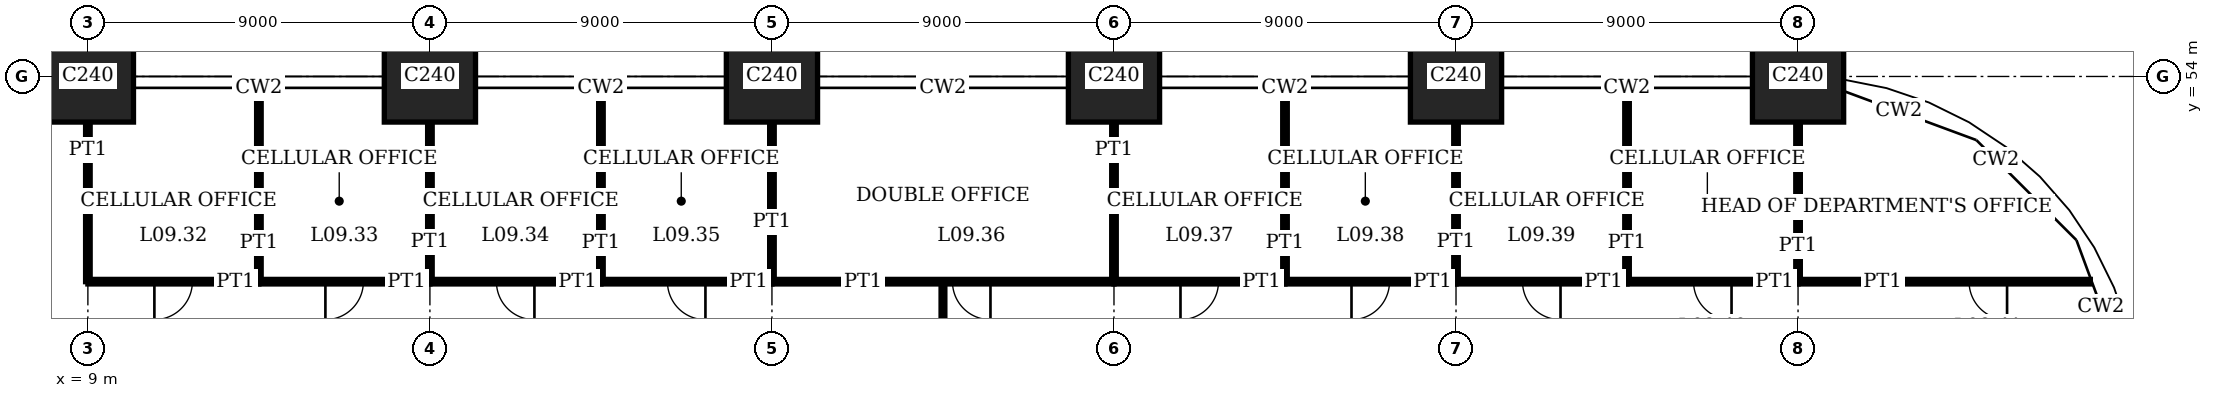
"""IFC4 building model, lengths in metres.
Left out: names, types, materials, properties, quantities, classifications, styles, units other than length and angle.
Written with IfcOpenShell. Run it as: python <this file> out.ifc"""

import sys

from ifc_helpers import new_model, si_unit, direction, frame, frame_2d, origin, origin_2d, place, context, subcontext, project, spatial, rectangle, extrude, element, fill, save


model = new_model("IFC4")
c1 = context("Model", 3, precision=1e-05, world=origin(), true_north=direction((0.0, 1.0)))
c2 = subcontext(c1, "Body", "Model", "MODEL_VIEW")
j1 = project(units=[si_unit("LENGTHUNIT", "METRE"), si_unit("PLANEANGLEUNIT", "RADIAN")], contexts=[c1])
p1 = place(None, origin())
s1 = spatial("IfcSite", under=j1, at=p1, CompositionType="ELEMENT")
p2 = place(p1, origin())
s2 = spatial("IfcBuilding", under=s1, at=p2, CompositionType="ELEMENT")
p3 = place(p2, frame((0.0, 0.0, 39.8)))
s3 = spatial("IfcBuildingStorey", under=s2, at=p3, CompositionType="ELEMENT", Elevation=39.8)
for number, where, z_axis, x_axis in (
    (1, (9.0, 54.0, 0.0), (0.0, 0.0, 1.0), (1.0, 0.0, 0.0)),
    (2, (18.0, 54.0, 0.0), (0.0, 0.0, 1.0), (1.0, 0.0, 0.0)),
    (3, (27.0, 54.0, 0.0), (0.0, 0.0, 1.0), (1.0, 0.0, 0.0)),
    (4, (36.0, 54.0, 0.0), (0.0, 0.0, 1.0), (1.0, 0.0, 0.0)),
    (5, (45.0, 54.0, 0.0), (0.0, 0.0, 1.0), (1.0, 0.0, 0.0)),
    (6, (54.0, 54.0, 0.0), (0.0, 0.0, 1.0), (1.0, 0.0, 0.0)),
):
    element("IfcColumn", number, at=place(p3, frame(where, z_axis=z_axis, x_axis=x_axis)), inside=s3, PredefinedType="COLUMN", context=c2, shape_type="SweptSolid", body=[
        extrude(rectangle(XDim=2.4, YDim=2.4, at=origin_2d()), origin(), (0.0, 0.0, 1.0), 4.0),
    ])
p4 = place(p3, frame((9.0, 48.6, 0.0), z_axis=(0.0, 0.0, 1.0), x_axis=(1.0, 0.0, 0.0)))
e7 = element("IfcWall", 7, at=p4, inside=s3, PredefinedType="PARTITIONING", context=c2, shape_type="SweptSolid", body=[
    extrude(rectangle(XDim=4.5, YDim=0.12, at=frame_2d((2.25, 0.0))), origin(), (0.0, 0.0, 1.0), 3.75),
])
p5 = place(p4, frame((1.75, 0.0, 0.0)))
e8 = element("IfcOpeningElement", 8, at=p5, cuts=e7, PredefinedType="OPENING", context=c2, shape_type="SweptSolid", body=[
    extrude(rectangle(XDim=1.0, YDim=2.4, at=frame_2d((0.5, 1.2))), frame((0.0, 0.07, 0.0), z_axis=(0.0, -1.0, 0.0), x_axis=(1.0, 0.0, 0.0)), (0.0, 0.0, 1.0), 0.14),
])
p6 = place(p3, frame((13.5, 48.6, 0.0), z_axis=(0.0, 0.0, 1.0), x_axis=(1.0, 0.0, 0.0)))
e9 = element("IfcWall", 9, at=p6, inside=s3, PredefinedType="PARTITIONING", context=c2, shape_type="SweptSolid", body=[
    extrude(rectangle(XDim=4.5, YDim=0.12, at=frame_2d((2.25, 0.0))), origin(), (0.0, 0.0, 1.0), 3.75),
])
p7 = place(p6, frame((1.75, 0.0, 0.0)))
e10 = element("IfcOpeningElement", 10, at=p7, cuts=e9, PredefinedType="OPENING", context=c2, shape_type="SweptSolid", body=[
    extrude(rectangle(XDim=1.0, YDim=2.4, at=frame_2d((0.5, 1.2))), frame((0.0, 0.07, 0.0), z_axis=(0.0, -1.0, 0.0), x_axis=(1.0, 0.0, 0.0)), (0.0, 0.0, 1.0), 0.14),
])
p8 = place(p3, frame((18.0, 48.6, 0.0), z_axis=(0.0, 0.0, 1.0), x_axis=(1.0, 0.0, 0.0)))
e11 = element("IfcWall", 11, at=p8, inside=s3, PredefinedType="PARTITIONING", context=c2, shape_type="SweptSolid", body=[
    extrude(rectangle(XDim=4.5, YDim=0.12, at=frame_2d((2.25, 0.0))), origin(), (0.0, 0.0, 1.0), 3.75),
])
p9 = place(p8, frame((1.75, 0.0, 0.0)))
e12 = element("IfcOpeningElement", 12, at=p9, cuts=e11, PredefinedType="OPENING", context=c2, shape_type="SweptSolid", body=[
    extrude(rectangle(XDim=1.0, YDim=2.4, at=frame_2d((0.5, 1.2))), frame((0.0, 0.07, 0.0), z_axis=(0.0, -1.0, 0.0), x_axis=(1.0, 0.0, 0.0)), (0.0, 0.0, 1.0), 0.14),
])
p10 = place(p3, frame((22.5, 48.6, 0.0), z_axis=(0.0, 0.0, 1.0), x_axis=(1.0, 0.0, 0.0)))
e13 = element("IfcWall", 13, at=p10, inside=s3, PredefinedType="PARTITIONING", context=c2, shape_type="SweptSolid", body=[
    extrude(rectangle(XDim=4.5, YDim=0.12, at=frame_2d((2.25, 0.0))), origin(), (0.0, 0.0, 1.0), 3.75),
])
p11 = place(p10, frame((1.75, 0.0, 0.0)))
e14 = element("IfcOpeningElement", 14, at=p11, cuts=e13, PredefinedType="OPENING", context=c2, shape_type="SweptSolid", body=[
    extrude(rectangle(XDim=1.0, YDim=2.4, at=frame_2d((0.5, 1.2))), frame((0.0, 0.07, 0.0), z_axis=(0.0, -1.0, 0.0), x_axis=(1.0, 0.0, 0.0)), (0.0, 0.0, 1.0), 0.14),
])
p12 = place(p3, frame((27.0, 48.6, 0.0), z_axis=(0.0, 0.0, 1.0), x_axis=(1.0, 0.0, 0.0)))
e15 = element("IfcWall", 15, at=p12, inside=s3, PredefinedType="PARTITIONING", context=c2, shape_type="SweptSolid", body=[
    extrude(rectangle(XDim=9.0, YDim=0.12, at=frame_2d((4.5, 0.0))), origin(), (0.0, 0.0, 1.0), 3.75),
])
p13 = place(p12, frame((4.75, 0.0, 0.0)))
e16 = element("IfcOpeningElement", 16, at=p13, cuts=e15, PredefinedType="OPENING", context=c2, shape_type="SweptSolid", body=[
    extrude(rectangle(XDim=1.0, YDim=2.4, at=frame_2d((0.5, 1.2))), frame((0.0, 0.07, 0.0), z_axis=(0.0, -1.0, 0.0), x_axis=(1.0, 0.0, 0.0)), (0.0, 0.0, 1.0), 0.14),
])
p14 = place(p3, frame((36.0, 48.6, 0.0), z_axis=(0.0, 0.0, 1.0), x_axis=(1.0, 0.0, 0.0)))
e17 = element("IfcWall", 17, at=p14, inside=s3, PredefinedType="PARTITIONING", context=c2, shape_type="SweptSolid", body=[
    extrude(rectangle(XDim=4.5, YDim=0.12, at=frame_2d((2.25, 0.0))), origin(), (0.0, 0.0, 1.0), 3.75),
])
p15 = place(p14, frame((1.75, 0.0, 0.0)))
e18 = element("IfcOpeningElement", 18, at=p15, cuts=e17, PredefinedType="OPENING", context=c2, shape_type="SweptSolid", body=[
    extrude(rectangle(XDim=1.0, YDim=2.4, at=frame_2d((0.5, 1.2))), frame((0.0, 0.07, 0.0), z_axis=(0.0, -1.0, 0.0), x_axis=(1.0, 0.0, 0.0)), (0.0, 0.0, 1.0), 0.14),
])
p16 = place(p3, frame((40.5, 48.6, 0.0), z_axis=(0.0, 0.0, 1.0), x_axis=(1.0, 0.0, 0.0)))
e19 = element("IfcWall", 19, at=p16, inside=s3, PredefinedType="PARTITIONING", context=c2, shape_type="SweptSolid", body=[
    extrude(rectangle(XDim=4.5, YDim=0.12, at=frame_2d((2.25, 0.0))), origin(), (0.0, 0.0, 1.0), 3.75),
])
p17 = place(p16, frame((1.75, 0.0, 0.0)))
e20 = element("IfcOpeningElement", 20, at=p17, cuts=e19, PredefinedType="OPENING", context=c2, shape_type="SweptSolid", body=[
    extrude(rectangle(XDim=1.0, YDim=2.4, at=frame_2d((0.5, 1.2))), frame((0.0, 0.07, 0.0), z_axis=(0.0, -1.0, 0.0), x_axis=(1.0, 0.0, 0.0)), (0.0, 0.0, 1.0), 0.14),
])
p18 = place(p3, frame((45.0, 48.6, 0.0), z_axis=(0.0, 0.0, 1.0), x_axis=(1.0, 0.0, 0.0)))
e21 = element("IfcWall", 21, at=p18, inside=s3, PredefinedType="PARTITIONING", context=c2, shape_type="SweptSolid", body=[
    extrude(rectangle(XDim=4.5, YDim=0.12, at=frame_2d((2.25, 0.0))), origin(), (0.0, 0.0, 1.0), 3.75),
])
p19 = place(p18, frame((1.75, 0.0, 0.0)))
e22 = element("IfcOpeningElement", 22, at=p19, cuts=e21, PredefinedType="OPENING", context=c2, shape_type="SweptSolid", body=[
    extrude(rectangle(XDim=1.0, YDim=2.4, at=frame_2d((0.5, 1.2))), frame((0.0, 0.07, 0.0), z_axis=(0.0, -1.0, 0.0), x_axis=(1.0, 0.0, 0.0)), (0.0, 0.0, 1.0), 0.14),
])
p20 = place(p3, frame((49.5, 48.6, 0.0), z_axis=(0.0, 0.0, 1.0), x_axis=(1.0, 0.0, 0.0)))
e23 = element("IfcWall", 23, at=p20, inside=s3, PredefinedType="PARTITIONING", context=c2, shape_type="SweptSolid", body=[
    extrude(rectangle(XDim=4.5, YDim=0.12, at=frame_2d((2.25, 0.0))), origin(), (0.0, 0.0, 1.0), 3.75),
])
p21 = place(p20, frame((1.75, 0.0, 0.0)))
e24 = element("IfcOpeningElement", 24, at=p21, cuts=e23, PredefinedType="OPENING", context=c2, shape_type="SweptSolid", body=[
    extrude(rectangle(XDim=1.0, YDim=2.4, at=frame_2d((0.5, 1.2))), frame((0.0, 0.07, 0.0), z_axis=(0.0, -1.0, 0.0), x_axis=(1.0, 0.0, 0.0)), (0.0, 0.0, 1.0), 0.14),
])
p22 = place(p3, frame((54.0, 48.6, 0.0), z_axis=(0.0, 0.0, 1.0), x_axis=(1.0, 0.0, 0.0)))
e25 = element("IfcWall", 25, at=p22, inside=s3, PredefinedType="PARTITIONING", context=c2, shape_type="SweptSolid", body=[
    extrude(rectangle(XDim=7.69, YDim=0.12, at=frame_2d((3.845, 0.0))), origin(), (0.0, 0.0, 1.0), 3.75),
])
p23 = place(p22, frame((4.5, 0.0, 0.0)))
e26 = element("IfcOpeningElement", 26, at=p23, cuts=e25, PredefinedType="OPENING", context=c2, shape_type="SweptSolid", body=[
    extrude(rectangle(XDim=1.0, YDim=2.4, at=frame_2d((0.5, 1.2))), frame((0.0, 0.07, 0.0), z_axis=(0.0, -1.0, 0.0), x_axis=(1.0, 0.0, 0.0)), (0.0, 0.0, 1.0), 0.14),
])
p24 = place(p3, frame((9.0, 48.6, 0.0), z_axis=(0.0, 0.0, 1.0), x_axis=(0.0, 1.0, 0.0)))
e27 = element("IfcWall", 27, at=p24, inside=s3, PredefinedType="PARTITIONING", context=c2, shape_type="SweptSolid", body=[
    extrude(rectangle(XDim=4.2, YDim=0.12, at=frame_2d((2.1, 0.0))), origin(), (0.0, 0.0, 1.0), 3.05),
])
p25 = place(p3, frame((13.5, 48.6, 0.0), z_axis=(0.0, 0.0, 1.0), x_axis=(0.0, 1.0, 0.0)))
e28 = element("IfcWall", 28, at=p25, inside=s3, PredefinedType="PARTITIONING", context=c2, shape_type="SweptSolid", body=[
    extrude(rectangle(XDim=5.09, YDim=0.12, at=frame_2d((2.545, 0.0))), origin(), (0.0, 0.0, 1.0), 3.75),
])
p26 = place(p3, frame((18.0, 48.6, 0.0), z_axis=(0.0, 0.0, 1.0), x_axis=(0.0, 1.0, 0.0)))
e29 = element("IfcWall", 29, at=p26, inside=s3, PredefinedType="PARTITIONING", context=c2, shape_type="SweptSolid", body=[
    extrude(rectangle(XDim=4.2, YDim=0.12, at=frame_2d((2.1, 0.0))), origin(), (0.0, 0.0, 1.0), 3.05),
])
p27 = place(p3, frame((22.5, 48.6, 0.0), z_axis=(0.0, 0.0, 1.0), x_axis=(0.0, 1.0, 0.0)))
e30 = element("IfcWall", 30, at=p27, inside=s3, PredefinedType="PARTITIONING", context=c2, shape_type="SweptSolid", body=[
    extrude(rectangle(XDim=5.09, YDim=0.12, at=frame_2d((2.545, 0.0))), origin(), (0.0, 0.0, 1.0), 3.75),
])
p28 = place(p3, frame((27.0, 48.6, 0.0), z_axis=(0.0, 0.0, 1.0), x_axis=(0.0, 1.0, 0.0)))
e31 = element("IfcWall", 31, at=p28, inside=s3, PredefinedType="PARTITIONING", context=c2, shape_type="SweptSolid", body=[
    extrude(rectangle(XDim=4.2, YDim=0.12, at=frame_2d((2.1, 0.0))), origin(), (0.0, 0.0, 1.0), 3.05),
])
p29 = place(p3, frame((31.5, 38.35, 0.0), z_axis=(0.0, 0.0, 1.0), x_axis=(0.0, 1.0, 0.0)))
e32 = element("IfcWall", 32, at=p29, inside=s3, PredefinedType="PARTITIONING", context=c2, shape_type="SweptSolid", body=[
    extrude(rectangle(XDim=10.26, YDim=0.1, at=frame_2d((5.13, 0.0))), origin(), (0.0, 0.0, 1.0), 3.75),
])
p30 = place(p3, frame((36.0, 48.6, 0.0), z_axis=(0.0, 0.0, 1.0), x_axis=(0.0, 1.0, 0.0)))
e33 = element("IfcWall", 33, at=p30, inside=s3, PredefinedType="PARTITIONING", context=c2, shape_type="SweptSolid", body=[
    extrude(rectangle(XDim=4.2, YDim=0.12, at=frame_2d((2.1, 0.0))), origin(), (0.0, 0.0, 1.0), 3.05),
])
p31 = place(p3, frame((40.5, 48.6, 0.0), z_axis=(0.0, 0.0, 1.0), x_axis=(0.0, 1.0, 0.0)))
e34 = element("IfcWall", 34, at=p31, inside=s3, PredefinedType="PARTITIONING", context=c2, shape_type="SweptSolid", body=[
    extrude(rectangle(XDim=5.09, YDim=0.12, at=frame_2d((2.545, 0.0))), origin(), (0.0, 0.0, 1.0), 3.75),
])
p32 = place(p3, frame((45.0, 48.6, 0.0), z_axis=(0.0, 0.0, 1.0), x_axis=(0.0, 1.0, 0.0)))
e35 = element("IfcWall", 35, at=p32, inside=s3, PredefinedType="PARTITIONING", context=c2, shape_type="SweptSolid", body=[
    extrude(rectangle(XDim=4.2, YDim=0.12, at=frame_2d((2.1, 0.0))), origin(), (0.0, 0.0, 1.0), 3.05),
])
p33 = place(p3, frame((49.5, 48.6, 0.0), z_axis=(0.0, 0.0, 1.0), x_axis=(0.0, 1.0, 0.0)))
e36 = element("IfcWall", 36, at=p33, inside=s3, PredefinedType="PARTITIONING", context=c2, shape_type="SweptSolid", body=[
    extrude(rectangle(XDim=5.09, YDim=0.12, at=frame_2d((2.545, 0.0))), origin(), (0.0, 0.0, 1.0), 3.75),
])
p34 = place(p3, frame((54.0, 48.6, 0.0), z_axis=(0.0, 0.0, 1.0), x_axis=(0.0, 1.0, 0.0)))
e37 = element("IfcWall", 37, at=p34, inside=s3, PredefinedType="PARTITIONING", context=c2, shape_type="SweptSolid", body=[
    extrude(rectangle(XDim=4.2, YDim=0.12, at=frame_2d((2.1, 0.0))), origin(), (0.0, 0.0, 1.0), 3.05),
])
p35 = place(p5, origin())
e38 = element("IfcDoor", 38, at=p35, inside=s3, OperationType="SINGLE_SWING_LEFT", PredefinedType="DOOR", context=c2, shape_type="SweptSolid", body=[
    extrude(rectangle(XDim=1.0, YDim=2.4, at=frame_2d((0.5, 1.2))), frame((0.0, 0.025, 0.0), z_axis=(0.0, -1.0, 0.0), x_axis=(1.0, 0.0, 0.0)), (0.0, 0.0, 1.0), 0.05),
])
fill(e8, e38)
p36 = place(p7, origin())
e39 = element("IfcDoor", 39, at=p36, inside=s3, OperationType="SINGLE_SWING_LEFT", PredefinedType="DOOR", context=c2, shape_type="SweptSolid", body=[
    extrude(rectangle(XDim=1.0, YDim=2.4, at=frame_2d((0.5, 1.2))), frame((0.0, 0.025, 0.0), z_axis=(0.0, -1.0, 0.0), x_axis=(1.0, 0.0, 0.0)), (0.0, 0.0, 1.0), 0.05),
])
fill(e10, e39)
p37 = place(p9, origin())
e40 = element("IfcDoor", 40, at=p37, inside=s3, OperationType="SINGLE_SWING_RIGHT", PredefinedType="DOOR", context=c2, shape_type="SweptSolid", body=[
    extrude(rectangle(XDim=1.0, YDim=2.4, at=frame_2d((0.5, 1.2))), frame((0.0, 0.025, 0.0), z_axis=(0.0, -1.0, 0.0), x_axis=(1.0, 0.0, 0.0)), (0.0, 0.0, 1.0), 0.05),
])
fill(e12, e40)
p38 = place(p11, origin())
e41 = element("IfcDoor", 41, at=p38, inside=s3, OperationType="SINGLE_SWING_RIGHT", PredefinedType="DOOR", context=c2, shape_type="SweptSolid", body=[
    extrude(rectangle(XDim=1.0, YDim=2.4, at=frame_2d((0.5, 1.2))), frame((0.0, 0.025, 0.0), z_axis=(0.0, -1.0, 0.0), x_axis=(1.0, 0.0, 0.0)), (0.0, 0.0, 1.0), 0.05),
])
fill(e14, e41)
p39 = place(p13, origin())
e42 = element("IfcDoor", 42, at=p39, inside=s3, OperationType="SINGLE_SWING_RIGHT", PredefinedType="DOOR", context=c2, shape_type="SweptSolid", body=[
    extrude(rectangle(XDim=1.0, YDim=2.4, at=frame_2d((0.5, 1.2))), frame((0.0, 0.025, 0.0), z_axis=(0.0, -1.0, 0.0), x_axis=(1.0, 0.0, 0.0)), (0.0, 0.0, 1.0), 0.05),
])
fill(e16, e42)
p40 = place(p15, origin())
e43 = element("IfcDoor", 43, at=p40, inside=s3, OperationType="SINGLE_SWING_LEFT", PredefinedType="DOOR", context=c2, shape_type="SweptSolid", body=[
    extrude(rectangle(XDim=1.0, YDim=2.4, at=frame_2d((0.5, 1.2))), frame((0.0, 0.025, 0.0), z_axis=(0.0, -1.0, 0.0), x_axis=(1.0, 0.0, 0.0)), (0.0, 0.0, 1.0), 0.05),
])
fill(e18, e43)
p41 = place(p17, origin())
e44 = element("IfcDoor", 44, at=p41, inside=s3, OperationType="SINGLE_SWING_LEFT", PredefinedType="DOOR", context=c2, shape_type="SweptSolid", body=[
    extrude(rectangle(XDim=1.0, YDim=2.4, at=frame_2d((0.5, 1.2))), frame((0.0, 0.025, 0.0), z_axis=(0.0, -1.0, 0.0), x_axis=(1.0, 0.0, 0.0)), (0.0, 0.0, 1.0), 0.05),
])
fill(e20, e44)
p42 = place(p19, origin())
e45 = element("IfcDoor", 45, at=p42, inside=s3, OperationType="SINGLE_SWING_RIGHT", PredefinedType="DOOR", context=c2, shape_type="SweptSolid", body=[
    extrude(rectangle(XDim=1.0, YDim=2.4, at=frame_2d((0.5, 1.2))), frame((0.0, 0.025, 0.0), z_axis=(0.0, -1.0, 0.0), x_axis=(1.0, 0.0, 0.0)), (0.0, 0.0, 1.0), 0.05),
])
fill(e22, e45)
p43 = place(p21, origin())
e46 = element("IfcDoor", 46, at=p43, inside=s3, OperationType="SINGLE_SWING_RIGHT", PredefinedType="DOOR", context=c2, shape_type="SweptSolid", body=[
    extrude(rectangle(XDim=1.0, YDim=2.4, at=frame_2d((0.5, 1.2))), frame((0.0, 0.025, 0.0), z_axis=(0.0, -1.0, 0.0), x_axis=(1.0, 0.0, 0.0)), (0.0, 0.0, 1.0), 0.05),
])
fill(e24, e46)
p44 = place(p23, origin())
e47 = element("IfcDoor", 47, at=p44, inside=s3, OperationType="SINGLE_SWING_RIGHT", PredefinedType="DOOR", context=c2, shape_type="SweptSolid", body=[
    extrude(rectangle(XDim=1.0, YDim=2.4, at=frame_2d((0.5, 1.2))), frame((0.0, 0.025, 0.0), z_axis=(0.0, -1.0, 0.0), x_axis=(1.0, 0.0, 0.0)), (0.0, 0.0, 1.0), 0.05),
])
fill(e26, e47)
save(model, sys.argv[1])
